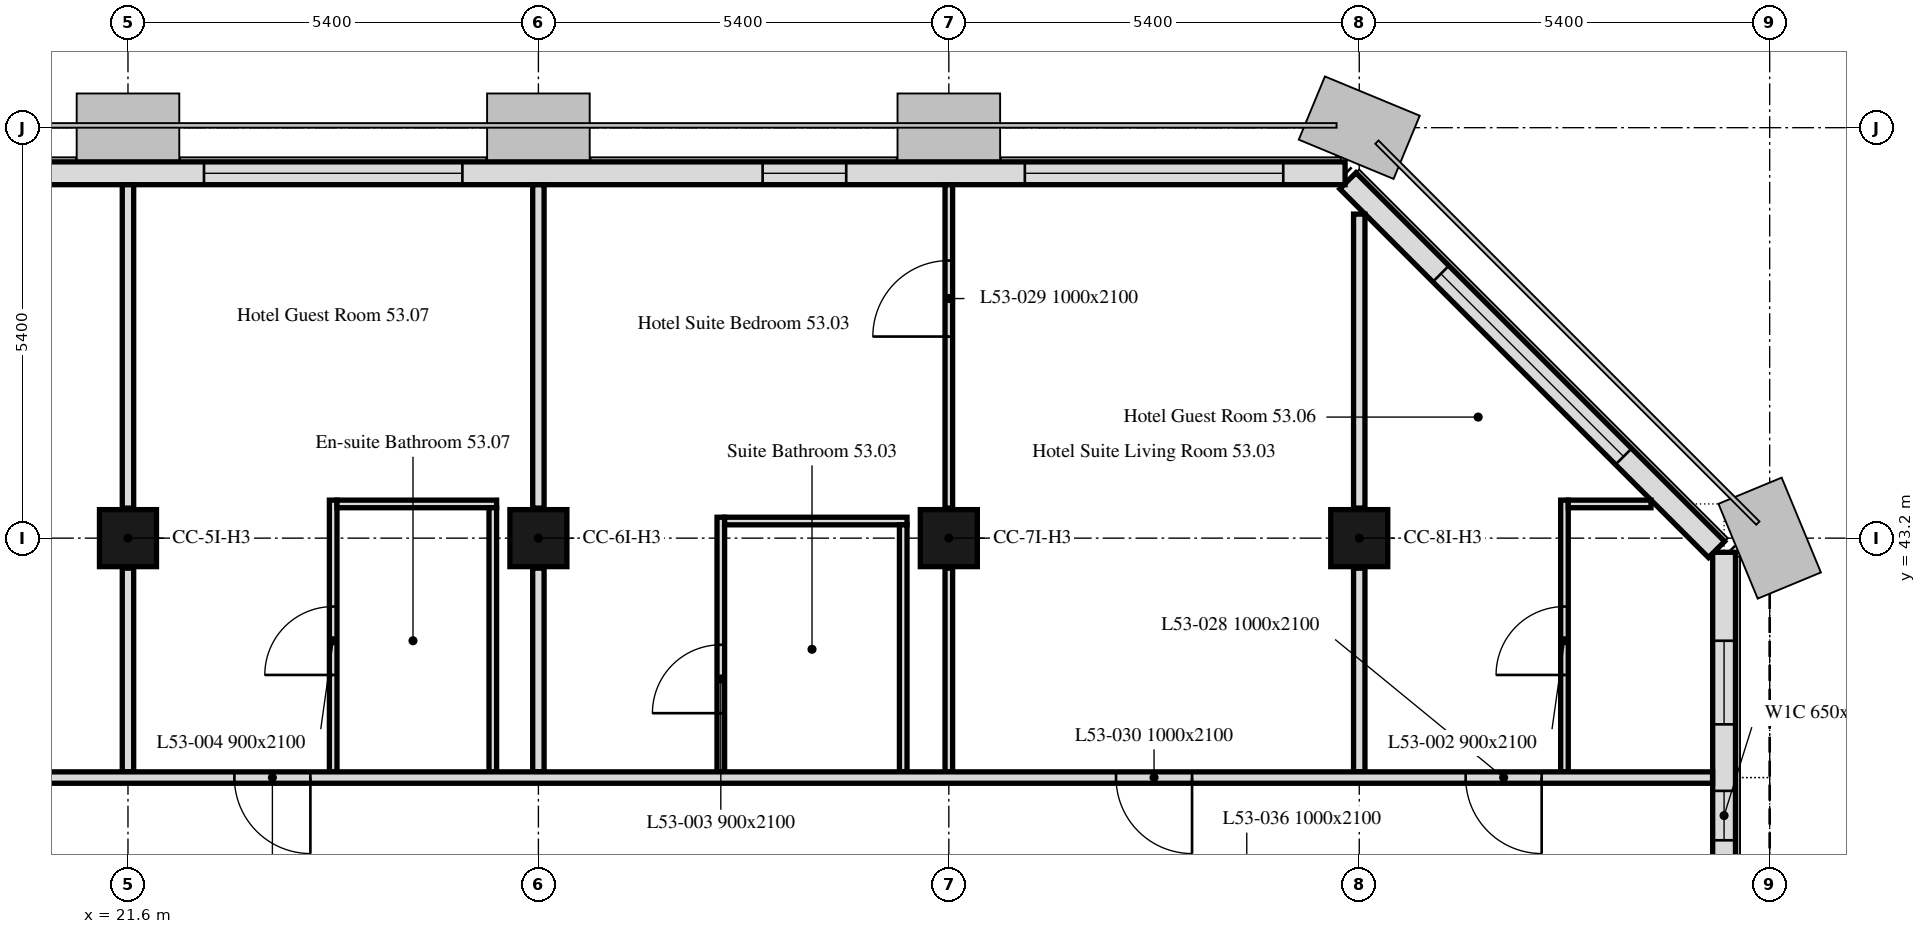
"""IFC4 building model, lengths in metres.
Left out: names, types, materials, properties, quantities, classifications, styles, units other than length and angle.
Written with IfcOpenShell. Run it as: python <this file> out.ifc"""

import sys

from ifc_helpers import new_model, si_unit, direction, frame, frame_2d, origin, origin_2d, place, context, subcontext, project, spatial, rectangle, extrude, element, fill, save


model = new_model("IFC4")
c1 = context("Model", 3, precision=1e-05, world=origin(), true_north=direction((0.0, 1.0)))
c2 = subcontext(c1, "Body", "Model", "MODEL_VIEW")
j1 = project(units=[si_unit("LENGTHUNIT", "METRE"), si_unit("PLANEANGLEUNIT", "RADIAN")], contexts=[c1])
p1 = place(None, origin())
s1 = spatial("IfcSite", under=j1, at=p1, CompositionType="ELEMENT")
p2 = place(p1, origin())
s2 = spatial("IfcBuilding", under=s1, at=p2, CompositionType="ELEMENT")
p3 = place(p2, frame((0.0, 0.0, 213.7)))
s3 = spatial("IfcBuildingStorey", under=s2, at=p3, CompositionType="ELEMENT", Elevation=213.7)
for number, where, z_axis, x_axis in (
    (1, (21.6, 43.2, 0.0), (0.0, 0.0, 1.0), (1.0, 0.0, 0.0)),
    (2, (27.0, 43.2, 0.0), (0.0, 0.0, 1.0), (1.0, 0.0, 0.0)),
    (3, (32.4, 43.2, 0.0), (0.0, 0.0, 1.0), (1.0, 0.0, 0.0)),
    (4, (37.8, 43.2, 0.0), (0.0, 0.0, 1.0), (1.0, 0.0, 0.0)),
):
    element("IfcColumn", number, at=place(p3, frame(where, z_axis=z_axis, x_axis=x_axis)), inside=s3, PredefinedType="COLUMN", context=c2, shape_type="SweptSolid", body=[
        extrude(rectangle(XDim=0.75, YDim=0.75, at=origin_2d()), origin(), (0.0, 0.0, 1.0), 3.0),
    ])
p4 = place(p3, frame((42.6, 32.4, 0.0), z_axis=(0.0, 0.0, 1.0), x_axis=(0.0, 1.0, 0.0)))
e5 = element("IfcWall", 5, at=p4, inside=s3, PredefinedType="SOLIDWALL", context=c2, shape_type="SweptSolid", body=[
    extrude(rectangle(XDim=10.614, YDim=0.3, at=frame_2d((5.307, 0.0))), origin(), (0.0, 0.0, 1.0), 3.0),
])
p5 = place(p4, frame((1.0, 0.0, 0.9)))
e6 = element("IfcOpeningElement", 6, at=p5, cuts=e5, PredefinedType="OPENING", context=c2, shape_type="SweptSolid", body=[
    extrude(rectangle(XDim=3.4, YDim=1.7, at=frame_2d((1.7, 0.85))), frame((0.0, 0.16, 0.0), z_axis=(0.0, -1.0, 0.0), x_axis=(1.0, 0.0, 0.0)), (0.0, 0.0, 1.0), 0.32),
])
p6 = place(p4, frame((6.825, 0.0, 0.9)))
e7 = element("IfcOpeningElement", 7, at=p6, cuts=e5, PredefinedType="OPENING", context=c2, shape_type="SweptSolid", body=[
    extrude(rectangle(XDim=0.65, YDim=1.7, at=frame_2d((0.325, 0.85))), frame((0.0, 0.16, 0.0), z_axis=(0.0, -1.0, 0.0), x_axis=(1.0, 0.0, 0.0)), (0.0, 0.0, 1.0), 0.32),
])
p7 = place(p4, frame((8.35, 0.0, 0.9)))
e8 = element("IfcOpeningElement", 8, at=p7, cuts=e5, PredefinedType="OPENING", context=c2, shape_type="SweptSolid", body=[
    extrude(rectangle(XDim=1.1, YDim=1.7, at=frame_2d((0.55, 0.85))), frame((0.0, 0.16, 0.0), z_axis=(0.0, -1.0, 0.0), x_axis=(1.0, 0.0, 0.0)), (0.0, 0.0, 1.0), 0.32),
])
p8 = place(p3, frame((42.501, 43.051, 0.0), z_axis=(0.0, 0.0, 1.0), x_axis=(-0.707106781187, 0.707106781187, 0.0)))
e9 = element("IfcWall", 9, at=p8, inside=s3, PredefinedType="SOLIDWALL", context=c2, shape_type="SweptSolid", body=[
    extrude(rectangle(XDim=6.86, YDim=0.3, at=frame_2d((3.43, 0.0))), origin(), (0.0, 0.0, 1.0), 3.0),
])
p9 = place(p8, frame((1.73, 0.0, 0.9)))
e10 = element("IfcOpeningElement", 10, at=p9, cuts=e9, PredefinedType="OPENING", context=c2, shape_type="SweptSolid", body=[
    extrude(rectangle(XDim=3.4, YDim=1.7, at=frame_2d((1.7, 0.85))), frame((0.0, 0.16, 0.0), z_axis=(0.0, -1.0, 0.0), x_axis=(1.0, 0.0, 0.0)), (0.0, 0.0, 1.0), 0.32),
])
p10 = place(p3, frame((37.614, 48.0, 0.0), z_axis=(0.0, 0.0, 1.0), x_axis=(-1.0, 0.0, 0.0)))
e11 = element("IfcWall", 11, at=p10, inside=s3, PredefinedType="SOLIDWALL", context=c2, shape_type="SweptSolid", body=[
    extrude(rectangle(XDim=32.027, YDim=0.3, at=frame_2d((16.014, 0.0))), origin(), (0.0, 0.0, 1.0), 3.0),
])
p11 = place(p10, frame((0.814, 0.0, 0.9)))
e12 = element("IfcOpeningElement", 12, at=p11, cuts=e11, PredefinedType="OPENING", context=c2, shape_type="SweptSolid", body=[
    extrude(rectangle(XDim=3.4, YDim=1.7, at=frame_2d((1.7, 0.85))), frame((0.0, 0.16, 0.0), z_axis=(0.0, -1.0, 0.0), x_axis=(1.0, 0.0, 0.0)), (0.0, 0.0, 1.0), 0.32),
])
p12 = place(p10, frame((6.564, 0.0, 0.9)))
e13 = element("IfcOpeningElement", 13, at=p12, cuts=e11, PredefinedType="OPENING", context=c2, shape_type="SweptSolid", body=[
    extrude(rectangle(XDim=1.1, YDim=1.7, at=frame_2d((0.55, 0.85))), frame((0.0, 0.16, 0.0), z_axis=(0.0, -1.0, 0.0), x_axis=(1.0, 0.0, 0.0)), (0.0, 0.0, 1.0), 0.32),
])
p13 = place(p10, frame((11.614, 0.0, 0.9)))
e14 = element("IfcOpeningElement", 14, at=p13, cuts=e11, PredefinedType="OPENING", context=c2, shape_type="SweptSolid", body=[
    extrude(rectangle(XDim=3.4, YDim=1.7, at=frame_2d((1.7, 0.85))), frame((0.0, 0.16, 0.0), z_axis=(0.0, -1.0, 0.0), x_axis=(1.0, 0.0, 0.0)), (0.0, 0.0, 1.0), 0.32),
])
p14 = place(p10, frame((17.364, 0.0, 0.9)))
e15 = element("IfcOpeningElement", 15, at=p14, cuts=e11, PredefinedType="OPENING", context=c2, shape_type="SweptSolid", body=[
    extrude(rectangle(XDim=1.1, YDim=1.7, at=frame_2d((0.55, 0.85))), frame((0.0, 0.16, 0.0), z_axis=(0.0, -1.0, 0.0), x_axis=(1.0, 0.0, 0.0)), (0.0, 0.0, 1.0), 0.32),
])
p15 = place(p10, frame((22.414, 0.0, 0.9)))
e16 = element("IfcOpeningElement", 16, at=p15, cuts=e11, PredefinedType="OPENING", context=c2, shape_type="SweptSolid", body=[
    extrude(rectangle(XDim=3.4, YDim=1.7, at=frame_2d((1.7, 0.85))), frame((0.0, 0.16, 0.0), z_axis=(0.0, -1.0, 0.0), x_axis=(1.0, 0.0, 0.0)), (0.0, 0.0, 1.0), 0.32),
])
p16 = place(p10, frame((28.164, 0.0, 0.9)))
e17 = element("IfcOpeningElement", 17, at=p16, cuts=e11, PredefinedType="OPENING", context=c2, shape_type="SweptSolid", body=[
    extrude(rectangle(XDim=1.1, YDim=1.7, at=frame_2d((0.55, 0.85))), frame((0.0, 0.16, 0.0), z_axis=(0.0, -1.0, 0.0), x_axis=(1.0, 0.0, 0.0)), (0.0, 0.0, 1.0), 0.32),
])
p17 = place(p3, frame((37.8, 47.463, 0.0), z_axis=(0.0, 0.0, 1.0), x_axis=(0.0, -1.0, 0.0)))
e18 = element("IfcWall", 18, at=p17, inside=s3, PredefinedType="PARTITIONING", context=c2, shape_type="SweptSolid", body=[
    extrude(rectangle(XDim=3.868, YDim=0.15, at=frame_2d((1.934, 0.0))), origin(), (0.0, 0.0, 1.0), 3.0),
])
p18 = place(p3, frame((37.8, 42.805, 0.0), z_axis=(0.0, 0.0, 1.0), x_axis=(0.0, -1.0, 0.0)))
e19 = element("IfcWall", 19, at=p18, inside=s3, PredefinedType="PARTITIONING", context=c2, shape_type="SweptSolid", body=[
    extrude(rectangle(XDim=2.68, YDim=0.15, at=frame_2d((1.34, 0.0))), origin(), (0.0, 0.0, 1.0), 3.0),
])
p19 = place(p3, frame((40.5, 40.125, 0.0), z_axis=(0.0, 0.0, 1.0), x_axis=(0.0, 1.0, 0.0)))
e20 = element("IfcWall", 20, at=p19, inside=s3, PredefinedType="PARTITIONING", context=c2, shape_type="SweptSolid", body=[
    extrude(rectangle(XDim=3.575, YDim=0.1, at=frame_2d((1.788, 0.0))), origin(), (0.0, 0.0, 1.0), 3.0),
])
p20 = place(p19, frame((1.275, 0.0, 0.0)))
e21 = element("IfcOpeningElement", 21, at=p20, cuts=e20, PredefinedType="OPENING", context=c2, shape_type="SweptSolid", body=[
    extrude(rectangle(XDim=0.9, YDim=2.1, at=frame_2d((0.45, 1.05))), frame((0.0, 0.05, 0.0), z_axis=(0.0, -1.0, 0.0), x_axis=(1.0, 0.0, 0.0)), (0.0, 0.0, 1.0), 0.1),
])
p21 = place(p3, frame((40.55, 43.65, 0.0), z_axis=(0.0, 0.0, 1.0), x_axis=(1.0, 0.0, 0.0)))
e22 = element("IfcWall", 22, at=p21, inside=s3, PredefinedType="PARTITIONING", context=c2, shape_type="SweptSolid", body=[
    extrude(rectangle(XDim=1.088, YDim=0.1, at=frame_2d((0.544, 0.0))), origin(), (0.0, 0.0, 1.0), 3.0),
])
p22 = place(p3, frame((27.0, 47.849, 0.0), z_axis=(0.0, 0.0, 1.0), x_axis=(0.0, -1.0, 0.0)))
e23 = element("IfcWall", 23, at=p22, inside=s3, PredefinedType="PARTITIONING", context=c2, shape_type="SweptSolid", body=[
    extrude(rectangle(XDim=4.254, YDim=0.15, at=frame_2d((2.127, 0.0))), origin(), (0.0, 0.0, 1.0), 2.4),
])
p23 = place(p3, frame((27.0, 42.805, 0.0), z_axis=(0.0, 0.0, 1.0), x_axis=(0.0, -1.0, 0.0)))
e24 = element("IfcWall", 24, at=p23, inside=s3, PredefinedType="PARTITIONING", context=c2, shape_type="SweptSolid", body=[
    extrude(rectangle(XDim=2.68, YDim=0.15, at=frame_2d((1.34, 0.0))), origin(), (0.0, 0.0, 1.0), 2.4),
])
p24 = place(p3, frame((29.4, 40.125, 0.0), z_axis=(0.0, 0.0, 1.0), x_axis=(0.0, 1.0, 0.0)))
e25 = element("IfcWall", 25, at=p24, inside=s3, PredefinedType="PARTITIONING", context=c2, shape_type="SweptSolid", body=[
    extrude(rectangle(XDim=3.35, YDim=0.1, at=frame_2d((1.675, 0.0))), origin(), (0.0, 0.0, 1.0), 3.0),
])
p25 = place(p24, frame((0.772, 0.0, 0.0)))
e26 = element("IfcOpeningElement", 26, at=p25, cuts=e25, PredefinedType="OPENING", context=c2, shape_type="SweptSolid", body=[
    extrude(rectangle(XDim=0.9, YDim=2.1, at=frame_2d((0.45, 1.05))), frame((0.0, 0.05, 0.0), z_axis=(0.0, -1.0, 0.0), x_axis=(1.0, 0.0, 0.0)), (0.0, 0.0, 1.0), 0.1),
])
p26 = place(p3, frame((29.45, 43.425, 0.0), z_axis=(0.0, 0.0, 1.0), x_axis=(1.0, 0.0, 0.0)))
e27 = element("IfcWall", 27, at=p26, inside=s3, PredefinedType="PARTITIONING", context=c2, shape_type="SweptSolid", body=[
    extrude(rectangle(XDim=2.4, YDim=0.1, at=frame_2d((1.2, 0.0))), origin(), (0.0, 0.0, 1.0), 3.0),
])
p27 = place(p3, frame((31.8, 43.375, 0.0), z_axis=(0.0, 0.0, 1.0), x_axis=(0.0, -1.0, 0.0)))
e28 = element("IfcWall", 28, at=p27, inside=s3, PredefinedType="PARTITIONING", context=c2, shape_type="SweptSolid", body=[
    extrude(rectangle(XDim=3.25, YDim=0.1, at=frame_2d((1.625, 0.0))), origin(), (0.0, 0.0, 1.0), 3.0),
])
p28 = place(p3, frame((32.4, 40.125, 0.0), z_axis=(0.0, 0.0, 1.0), x_axis=(0.0, 1.0, 0.0)))
e29 = element("IfcWall", 29, at=p28, inside=s3, PredefinedType="PARTITIONING", context=c2, shape_type="SweptSolid", body=[
    extrude(rectangle(XDim=2.68, YDim=0.1, at=frame_2d((1.34, 0.0))), origin(), (0.0, 0.0, 1.0), 2.4),
])
p29 = place(p3, frame((32.4, 43.595, 0.0), z_axis=(0.0, 0.0, 1.0), x_axis=(0.0, 1.0, 0.0)))
e30 = element("IfcWall", 30, at=p29, inside=s3, PredefinedType="PARTITIONING", context=c2, shape_type="SweptSolid", body=[
    extrude(rectangle(XDim=4.254, YDim=0.1, at=frame_2d((2.127, 0.0))), origin(), (0.0, 0.0, 1.0), 2.4),
])
p30 = place(p29, frame((2.257, 0.0, 0.0)))
e31 = element("IfcOpeningElement", 31, at=p30, cuts=e30, PredefinedType="OPENING", context=c2, shape_type="SweptSolid", body=[
    extrude(rectangle(XDim=1.0, YDim=2.1, at=frame_2d((0.5, 1.05))), frame((0.0, 0.05, 0.0), z_axis=(0.0, -1.0, 0.0), x_axis=(1.0, 0.0, 0.0)), (0.0, 0.0, 1.0), 0.1),
])
p31 = place(p3, frame((21.6, 47.849, 0.0), z_axis=(0.0, 0.0, 1.0), x_axis=(0.0, -1.0, 0.0)))
e32 = element("IfcWall", 32, at=p31, inside=s3, PredefinedType="PARTITIONING", context=c2, shape_type="SweptSolid", body=[
    extrude(rectangle(XDim=4.254, YDim=0.15, at=frame_2d((2.127, 0.0))), origin(), (0.0, 0.0, 1.0), 2.4),
])
p32 = place(p3, frame((21.6, 42.805, 0.0), z_axis=(0.0, 0.0, 1.0), x_axis=(0.0, -1.0, 0.0)))
e33 = element("IfcWall", 33, at=p32, inside=s3, PredefinedType="PARTITIONING", context=c2, shape_type="SweptSolid", body=[
    extrude(rectangle(XDim=2.68, YDim=0.15, at=frame_2d((1.34, 0.0))), origin(), (0.0, 0.0, 1.0), 2.4),
])
p33 = place(p3, frame((24.3, 40.125, 0.0), z_axis=(0.0, 0.0, 1.0), x_axis=(0.0, 1.0, 0.0)))
e34 = element("IfcWall", 34, at=p33, inside=s3, PredefinedType="PARTITIONING", context=c2, shape_type="SweptSolid", body=[
    extrude(rectangle(XDim=3.575, YDim=0.1, at=frame_2d((1.788, 0.0))), origin(), (0.0, 0.0, 1.0), 3.0),
])
p34 = place(p33, frame((1.275, 0.0, 0.0)))
e35 = element("IfcOpeningElement", 35, at=p34, cuts=e34, PredefinedType="OPENING", context=c2, shape_type="SweptSolid", body=[
    extrude(rectangle(XDim=0.9, YDim=2.1, at=frame_2d((0.45, 1.05))), frame((0.0, 0.05, 0.0), z_axis=(0.0, -1.0, 0.0), x_axis=(1.0, 0.0, 0.0)), (0.0, 0.0, 1.0), 0.1),
])
p35 = place(p3, frame((24.35, 43.65, 0.0), z_axis=(0.0, 0.0, 1.0), x_axis=(1.0, 0.0, 0.0)))
e36 = element("IfcWall", 36, at=p35, inside=s3, PredefinedType="PARTITIONING", context=c2, shape_type="SweptSolid", body=[
    extrude(rectangle(XDim=2.1, YDim=0.1, at=frame_2d((1.05, 0.0))), origin(), (0.0, 0.0, 1.0), 3.0),
])
p36 = place(p3, frame((26.4, 43.6, 0.0), z_axis=(0.0, 0.0, 1.0), x_axis=(0.0, -1.0, 0.0)))
e37 = element("IfcWall", 37, at=p36, inside=s3, PredefinedType="PARTITIONING", context=c2, shape_type="SweptSolid", body=[
    extrude(rectangle(XDim=3.475, YDim=0.1, at=frame_2d((1.738, 0.0))), origin(), (0.0, 0.0, 1.0), 3.0),
])
p37 = place(p3, frame((42.449, 40.05, 0.0), z_axis=(0.0, 0.0, 1.0), x_axis=(-1.0, 0.0, 0.0)))
e38 = element("IfcWall", 38, at=p37, inside=s3, PredefinedType="PARTITIONING", context=c2, shape_type="SweptSolid", body=[
    extrude(rectangle(XDim=41.698, YDim=0.15, at=frame_2d((20.849, 0.0))), origin(), (0.0, 0.0, 1.0), 2.4),
])
p38 = place(p37, frame((2.249, 0.0, 0.0)))
e39 = element("IfcOpeningElement", 39, at=p38, cuts=e38, PredefinedType="OPENING", context=c2, shape_type="SweptSolid", body=[
    extrude(rectangle(XDim=1.0, YDim=2.1, at=frame_2d((0.5, 1.05))), frame((0.0, 0.075, 0.0), z_axis=(0.0, -1.0, 0.0), x_axis=(1.0, 0.0, 0.0)), (0.0, 0.0, 1.0), 0.15),
])
p39 = place(p37, frame((6.849, 0.0, 0.0)))
e40 = element("IfcOpeningElement", 40, at=p39, cuts=e38, PredefinedType="OPENING", context=c2, shape_type="SweptSolid", body=[
    extrude(rectangle(XDim=1.0, YDim=2.1, at=frame_2d((0.5, 1.05))), frame((0.0, 0.075, 0.0), z_axis=(0.0, -1.0, 0.0), x_axis=(1.0, 0.0, 0.0)), (0.0, 0.0, 1.0), 0.15),
])
p40 = place(p37, frame((18.449, 0.0, 0.0)))
e41 = element("IfcOpeningElement", 41, at=p40, cuts=e38, PredefinedType="OPENING", context=c2, shape_type="SweptSolid", body=[
    extrude(rectangle(XDim=1.0, YDim=2.1, at=frame_2d((0.5, 1.05))), frame((0.0, 0.075, 0.0), z_axis=(0.0, -1.0, 0.0), x_axis=(1.0, 0.0, 0.0)), (0.0, 0.0, 1.0), 0.15),
])
p41 = place(p37, frame((23.049, 0.0, 0.0)))
e42 = element("IfcOpeningElement", 42, at=p41, cuts=e38, PredefinedType="OPENING", context=c2, shape_type="SweptSolid", body=[
    extrude(rectangle(XDim=1.0, YDim=2.1, at=frame_2d((0.5, 1.05))), frame((0.0, 0.075, 0.0), z_axis=(0.0, -1.0, 0.0), x_axis=(1.0, 0.0, 0.0)), (0.0, 0.0, 1.0), 0.15),
])
p42 = place(p37, frame((37.849, 0.0, 0.0)))
e43 = element("IfcOpeningElement", 43, at=p42, cuts=e38, PredefinedType="OPENING", context=c2, shape_type="SweptSolid", body=[
    extrude(rectangle(XDim=1.0, YDim=2.1, at=frame_2d((0.5, 1.05))), frame((0.0, 0.075, 0.0), z_axis=(0.0, -1.0, 0.0), x_axis=(1.0, 0.0, 0.0)), (0.0, 0.0, 1.0), 0.15),
])
p43 = place(p6, origin())
e44 = element("IfcWindow", 44, at=p43, inside=s3, PartitioningType="SINGLE_PANEL", PredefinedType="WINDOW", context=c2, shape_type="SweptSolid", body=[
    extrude(rectangle(XDim=0.65, YDim=1.7, at=frame_2d((0.325, 0.85))), frame((0.0, 0.03, 0.0), z_axis=(0.0, -1.0, 0.0), x_axis=(1.0, 0.0, 0.0)), (0.0, 0.0, 1.0), 0.06),
])
fill(e7, e44)
p44 = place(p7, origin())
e45 = element("IfcWindow", 45, at=p44, inside=s3, PartitioningType="SINGLE_PANEL", PredefinedType="WINDOW", context=c2, shape_type="SweptSolid", body=[
    extrude(rectangle(XDim=1.1, YDim=1.7, at=frame_2d((0.55, 0.85))), frame((0.0, 0.03, 0.0), z_axis=(0.0, -1.0, 0.0), x_axis=(1.0, 0.0, 0.0)), (0.0, 0.0, 1.0), 0.06),
])
fill(e8, e45)
p45 = place(p9, origin())
e46 = element("IfcWindow", 46, at=p45, inside=s3, PartitioningType="SINGLE_PANEL", PredefinedType="WINDOW", context=c2, shape_type="SweptSolid", body=[
    extrude(rectangle(XDim=3.4, YDim=1.7, at=frame_2d((1.7, 0.85))), frame((0.0, 0.03, 0.0), z_axis=(0.0, -1.0, 0.0), x_axis=(1.0, 0.0, 0.0)), (0.0, 0.0, 1.0), 0.06),
])
fill(e10, e46)
p46 = place(p11, origin())
e47 = element("IfcWindow", 47, at=p46, inside=s3, PartitioningType="SINGLE_PANEL", PredefinedType="WINDOW", context=c2, shape_type="SweptSolid", body=[
    extrude(rectangle(XDim=3.4, YDim=1.7, at=frame_2d((1.7, 0.85))), frame((0.0, 0.03, 0.0), z_axis=(0.0, -1.0, 0.0), x_axis=(1.0, 0.0, 0.0)), (0.0, 0.0, 1.0), 0.06),
])
fill(e12, e47)
p47 = place(p12, origin())
e48 = element("IfcWindow", 48, at=p47, inside=s3, PartitioningType="SINGLE_PANEL", PredefinedType="WINDOW", context=c2, shape_type="SweptSolid", body=[
    extrude(rectangle(XDim=1.1, YDim=1.7, at=frame_2d((0.55, 0.85))), frame((0.0, 0.03, 0.0), z_axis=(0.0, -1.0, 0.0), x_axis=(1.0, 0.0, 0.0)), (0.0, 0.0, 1.0), 0.06),
])
fill(e13, e48)
p48 = place(p13, origin())
e49 = element("IfcWindow", 49, at=p48, inside=s3, PartitioningType="SINGLE_PANEL", PredefinedType="WINDOW", context=c2, shape_type="SweptSolid", body=[
    extrude(rectangle(XDim=3.4, YDim=1.7, at=frame_2d((1.7, 0.85))), frame((0.0, 0.03, 0.0), z_axis=(0.0, -1.0, 0.0), x_axis=(1.0, 0.0, 0.0)), (0.0, 0.0, 1.0), 0.06),
])
fill(e14, e49)
p49 = place(p20, origin())
e50 = element("IfcDoor", 50, at=p49, inside=s3, OperationType="SINGLE_SWING_RIGHT", PredefinedType="DOOR", context=c2, shape_type="SweptSolid", body=[
    extrude(rectangle(XDim=0.9, YDim=2.1, at=frame_2d((0.45, 1.05))), frame((0.0, 0.025, 0.0), z_axis=(0.0, -1.0, 0.0), x_axis=(1.0, 0.0, 0.0)), (0.0, 0.0, 1.0), 0.05),
])
fill(e21, e50)
p50 = place(p25, origin())
e51 = element("IfcDoor", 51, at=p50, inside=s3, OperationType="SINGLE_SWING_RIGHT", PredefinedType="DOOR", context=c2, shape_type="SweptSolid", body=[
    extrude(rectangle(XDim=0.9, YDim=2.1, at=frame_2d((0.45, 1.05))), frame((0.0, 0.025, 0.0), z_axis=(0.0, -1.0, 0.0), x_axis=(1.0, 0.0, 0.0)), (0.0, 0.0, 1.0), 0.05),
])
fill(e26, e51)
p51 = place(p34, origin())
e52 = element("IfcDoor", 52, at=p51, inside=s3, OperationType="SINGLE_SWING_LEFT", PredefinedType="DOOR", context=c2, shape_type="SweptSolid", body=[
    extrude(rectangle(XDim=0.9, YDim=2.1, at=frame_2d((0.45, 1.05))), frame((0.0, 0.025, 0.0), z_axis=(0.0, -1.0, 0.0), x_axis=(1.0, 0.0, 0.0)), (0.0, 0.0, 1.0), 0.05),
])
fill(e35, e52)
p52 = place(p38, origin())
e53 = element("IfcDoor", 53, at=p52, inside=s3, OperationType="SINGLE_SWING_RIGHT", PredefinedType="DOOR", context=c2, shape_type="SweptSolid", body=[
    extrude(rectangle(XDim=1.0, YDim=2.1, at=frame_2d((0.5, 1.05))), frame((0.0, 0.025, 0.0), z_axis=(0.0, -1.0, 0.0), x_axis=(1.0, 0.0, 0.0)), (0.0, 0.0, 1.0), 0.05),
])
fill(e39, e53)
p53 = place(p30, origin())
e54 = element("IfcDoor", 54, at=p53, inside=s3, OperationType="SINGLE_SWING_RIGHT", PredefinedType="DOOR", context=c2, shape_type="SweptSolid", body=[
    extrude(rectangle(XDim=1.0, YDim=2.1, at=frame_2d((0.5, 1.05))), frame((0.0, 0.025, 0.0), z_axis=(0.0, -1.0, 0.0), x_axis=(1.0, 0.0, 0.0)), (0.0, 0.0, 1.0), 0.05),
])
fill(e31, e54)
p54 = place(p39, origin())
e55 = element("IfcDoor", 55, at=p54, inside=s3, OperationType="SINGLE_SWING_RIGHT", PredefinedType="DOOR", context=c2, shape_type="SweptSolid", body=[
    extrude(rectangle(XDim=1.0, YDim=2.1, at=frame_2d((0.5, 1.05))), frame((0.0, 0.025, 0.0), z_axis=(0.0, -1.0, 0.0), x_axis=(1.0, 0.0, 0.0)), (0.0, 0.0, 1.0), 0.05),
])
fill(e40, e55)
p55 = place(p40, origin())
e56 = element("IfcDoor", 56, at=p55, inside=s3, OperationType="SINGLE_SWING_LEFT", PredefinedType="DOOR", context=c2, shape_type="SweptSolid", body=[
    extrude(rectangle(XDim=1.0, YDim=2.1, at=frame_2d((0.5, 1.05))), frame((0.0, 0.025, 0.0), z_axis=(0.0, -1.0, 0.0), x_axis=(1.0, 0.0, 0.0)), (0.0, 0.0, 1.0), 0.05),
])
fill(e41, e56)
save(model, sys.argv[1])
